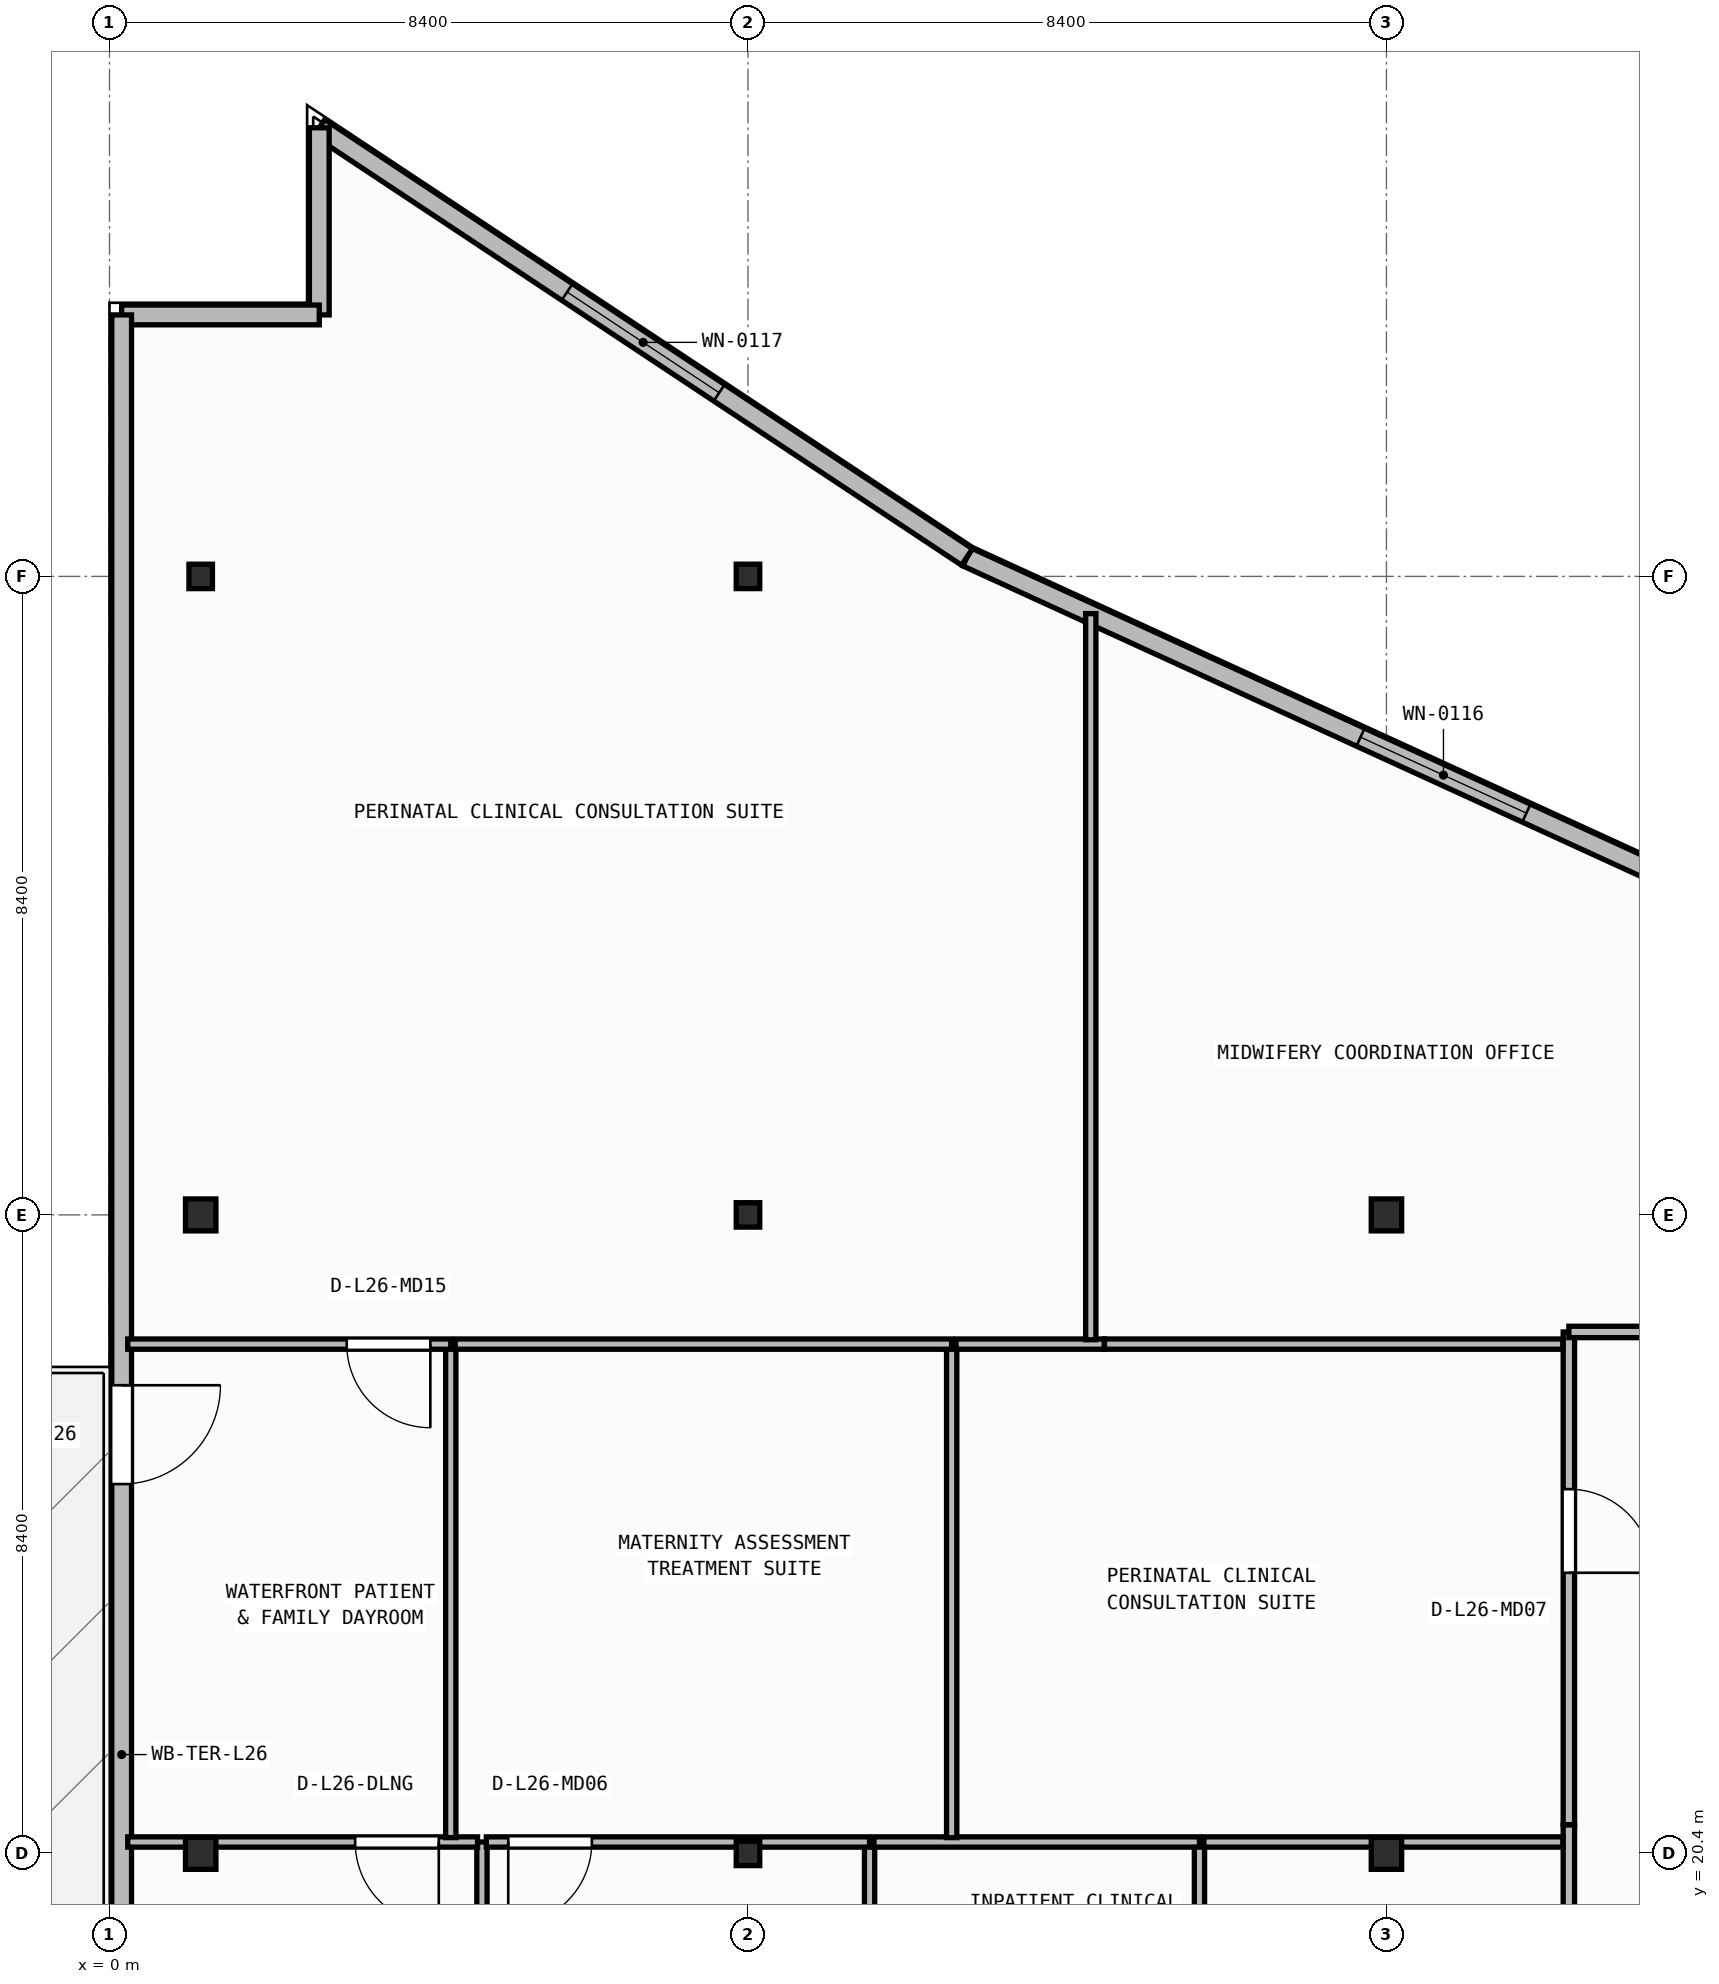
"""IFC4 building model, lengths in metres.
Left out: names, types, materials, properties, quantities, classifications, styles, units other than length and angle.
Written with IfcOpenShell. Run it as: python <this file> out.ifc"""

import sys

from ifc_helpers import new_model, si_unit, direction, frame, frame_2d, origin, origin_2d, place, context, subcontext, project, spatial, rectangle, i_section, extrude, element, fill, save


model = new_model("IFC4")
c1 = context("Model", 3, precision=1e-05, world=origin(), true_north=direction((0.0, 1.0)))
c2 = subcontext(c1, "Body", "Model", "MODEL_VIEW")
j1 = project(units=[si_unit("LENGTHUNIT", "METRE"), si_unit("PLANEANGLEUNIT", "RADIAN")], contexts=[c1])
p1 = place(None, origin())
s1 = spatial("IfcSite", under=j1, at=p1, CompositionType="ELEMENT")
p2 = place(p1, origin())
s2 = spatial("IfcBuilding", under=s1, at=p2, CompositionType="ELEMENT")
p3 = place(p2, frame((0.0, 0.0, 107.3)))
s3 = spatial("IfcBuildingStorey", under=s2, at=p3, CompositionType="ELEMENT", Elevation=107.3)
p4 = place(p3, frame((1.2, 20.4, 0.0), z_axis=(0.0, 0.0, 1.0), x_axis=(1.0, 0.0, 0.0)))
e1 = element("IfcColumn", 1, at=p4, inside=s3, PredefinedType="COLUMN", context=c2, shape_type="SweptSolid", body=[
    extrude(i_section(OverallWidth=0.4, OverallDepth=0.42, WebThickness=0.025, FlangeThickness=0.04, at=origin_2d()), origin(), (0.0, 0.0, 1.0), 3.95),
])
p5 = place(p3, frame((8.4, 20.4, 0.0), z_axis=(0.0, 0.0, 1.0), x_axis=(1.0, 0.0, 0.0)))
e2 = element("IfcColumn", 2, at=p5, inside=s3, PredefinedType="COLUMN", context=c2, shape_type="SweptSolid", body=[
    extrude(i_section(OverallWidth=0.309, OverallDepth=0.321, WebThickness=0.014, FlangeThickness=0.022, FilletRadius=0.017, at=origin_2d()), origin(), (0.0, 0.0, 1.0), 3.95),
])
for number, where, z_axis, x_axis in (
    (3, (16.8, 20.4, 0.0), (0.0, 0.0, 1.0), (1.0, 0.0, 0.0)),
    (4, (1.2, 28.8, 0.0), (0.0, 0.0, 1.0), (1.0, 0.0, 0.0)),
):
    element("IfcColumn", number, at=place(p3, frame(where, z_axis=z_axis, x_axis=x_axis)), inside=s3, PredefinedType="COLUMN", context=c2, shape_type="SweptSolid", body=[
        extrude(i_section(OverallWidth=0.4, OverallDepth=0.42, WebThickness=0.025, FlangeThickness=0.04, at=origin_2d()), origin(), (0.0, 0.0, 1.0), 3.95),
    ])
p6 = place(p3, frame((8.4, 28.8, 0.0), z_axis=(0.0, 0.0, 1.0), x_axis=(1.0, 0.0, 0.0)))
e5 = element("IfcColumn", 5, at=p6, inside=s3, PredefinedType="COLUMN", context=c2, shape_type="SweptSolid", body=[
    extrude(i_section(OverallWidth=0.309, OverallDepth=0.321, WebThickness=0.014, FlangeThickness=0.022, FilletRadius=0.017, at=origin_2d()), origin(), (0.0, 0.0, 1.0), 3.95),
])
p7 = place(p3, frame((16.8, 28.8, 0.0), z_axis=(0.0, 0.0, 1.0), x_axis=(1.0, 0.0, 0.0)))
e6 = element("IfcColumn", 6, at=p7, inside=s3, PredefinedType="COLUMN", context=c2, shape_type="SweptSolid", body=[
    extrude(i_section(OverallWidth=0.4, OverallDepth=0.42, WebThickness=0.025, FlangeThickness=0.04, at=origin_2d()), origin(), (0.0, 0.0, 1.0), 3.95),
])
for number, where, z_axis, x_axis in (
    (7, (1.2, 37.2, 0.0), (0.0, 0.0, 1.0), (1.0, 0.0, 0.0)),
    (8, (8.4, 37.2, 0.0), (0.0, 0.0, 1.0), (1.0, 0.0, 0.0)),
):
    element("IfcColumn", number, at=place(p3, frame(where, z_axis=z_axis, x_axis=x_axis)), inside=s3, PredefinedType="COLUMN", context=c2, shape_type="SweptSolid", body=[
        extrude(i_section(OverallWidth=0.309, OverallDepth=0.321, WebThickness=0.014, FlangeThickness=0.022, FilletRadius=0.017, at=origin_2d()), origin(), (0.0, 0.0, 1.0), 3.95),
    ])
p8 = place(p3, frame((23.818, 31.716, 0.0), z_axis=(0.0, 0.0, 1.0), x_axis=(-0.909209527513, 0.416338846471, 0.0)))
e9 = element("IfcWall", 9, at=p8, inside=s3, PredefinedType="STANDARD", context=c2, shape_type="SweptSolid", body=[
    extrude(rectangle(XDim=13.787, YDim=0.26, at=frame_2d((6.894, 0.0))), origin(), (0.0, 0.0, 1.0), 3.71),
])
p9 = place(p8, frame((5.694, 0.0, 0.9)))
e10 = element("IfcOpeningElement", 10, at=p9, cuts=e9, PredefinedType="OPENING", context=c2, shape_type="SweptSolid", body=[
    extrude(rectangle(XDim=2.4, YDim=1.65, at=frame_2d((1.2, 0.825))), frame((0.0, 0.14, 0.0), z_axis=(0.0, -1.0, 0.0), x_axis=(1.0, 0.0, 0.0)), (0.0, 0.0, 1.0), 0.28),
])
p10 = place(p3, frame((11.282, 37.456, 0.0), z_axis=(0.0, 0.0, 1.0), x_axis=(-0.833630474253, 0.552322580017, 0.0)))
e11 = element("IfcWall", 11, at=p10, inside=s3, PredefinedType="STANDARD", context=c2, shape_type="SweptSolid", body=[
    extrude(rectangle(XDim=10.223, YDim=0.26, at=frame_2d((5.111, 0.0))), origin(), (0.0, 0.0, 1.0), 3.71),
])
p11 = place(p10, frame((3.911, 0.0, 0.9)))
e12 = element("IfcOpeningElement", 12, at=p11, cuts=e11, PredefinedType="OPENING", context=c2, shape_type="SweptSolid", body=[
    extrude(rectangle(XDim=2.4, YDim=1.65, at=frame_2d((1.2, 0.825))), frame((0.0, 0.14, 0.0), z_axis=(0.0, -1.0, 0.0), x_axis=(1.0, 0.0, 0.0)), (0.0, 0.0, 1.0), 0.28),
])
p12 = place(p3, frame((2.76, 43.102, 0.0), z_axis=(0.0, 0.0, 1.0), x_axis=(0.0, -1.0, 0.0)))
e13 = element("IfcWall", 13, at=p12, inside=s3, PredefinedType="STANDARD", context=c2, shape_type="SweptSolid", body=[
    extrude(rectangle(XDim=2.462, YDim=0.26, at=frame_2d((1.231, 0.0))), origin(), (0.0, 0.0, 1.0), 3.71),
])
p13 = place(p3, frame((2.76, 40.64, 0.0), z_axis=(0.0, 0.0, 1.0), x_axis=(-1.0, 0.0, 0.0)))
e14 = element("IfcWall", 14, at=p13, inside=s3, PredefinedType="STANDARD", context=c2, shape_type="SweptSolid", body=[
    extrude(rectangle(XDim=2.6, YDim=0.26, at=frame_2d((1.3, 0.0))), origin(), (0.0, 0.0, 1.0), 3.71),
])
p14 = place(p3, frame((0.16, 40.64, 0.0), z_axis=(0.0, 0.0, 1.0), x_axis=(0.0, -1.0, 0.0)))
e15 = element("IfcWall", 15, at=p14, inside=s3, PredefinedType="STANDARD", context=c2, shape_type="SweptSolid", body=[
    extrude(rectangle(XDim=37.88, YDim=0.26, at=frame_2d((18.94, 0.0))), origin(), (0.0, 0.0, 1.0), 3.71),
])
p15 = place(p14, frame((14.081, 0.0, 0.0)))
e16 = element("IfcOpeningElement", 16, at=p15, cuts=e15, PredefinedType="OPENING", context=c2, shape_type="SweptSolid", body=[
    extrude(rectangle(XDim=1.3, YDim=2.15, at=frame_2d((0.65, 1.075))), frame((0.0, 0.14, 0.0), z_axis=(0.0, -1.0, 0.0), x_axis=(1.0, 0.0, 0.0)), (0.0, 0.0, 1.0), 0.28),
])
p16 = place(p3, frame((19.2, 20.776, 0.0), z_axis=(0.0, 0.0, 1.0), x_axis=(0.0, -1.0, 0.0)))
e17 = element("IfcWall", 17, at=p16, inside=s3, PredefinedType="PARTITIONING", context=c2, shape_type="SweptSolid", body=[
    extrude(rectangle(XDim=6.076, YDim=0.15, at=frame_2d((3.038, 0.0))), origin(), (0.0, 0.0, 1.0), 3.71),
])
p17 = place(p3, frame((19.2, 27.26, 0.0), z_axis=(0.0, 0.0, 1.0), x_axis=(0.0, -1.0, 0.0)))
e18 = element("IfcWall", 18, at=p17, inside=s3, PredefinedType="PARTITIONING", context=c2, shape_type="SweptSolid", body=[
    extrude(rectangle(XDim=6.482, YDim=0.15, at=frame_2d((3.241, 0.0))), origin(), (0.0, 0.0, 1.0), 3.71),
])
p18 = place(p17, frame((2.068, 0.0, 0.0)))
e19 = element("IfcOpeningElement", 19, at=p18, cuts=e18, PredefinedType="OPENING", context=c2, shape_type="SweptSolid", body=[
    extrude(rectangle(XDim=1.1, YDim=2.1, at=frame_2d((0.55, 1.05))), frame((0.0, 0.085, 0.0), z_axis=(0.0, -1.0, 0.0), x_axis=(1.0, 0.0, 0.0)), (0.0, 0.0, 1.0), 0.17),
])
p19 = place(p3, frame((21.7, 27.26, 0.0), z_axis=(0.0, 0.0, 1.0), x_axis=(-1.0, 0.0, 0.0)))
e20 = element("IfcWall", 20, at=p19, inside=s3, PredefinedType="PARTITIONING", context=c2, shape_type="SweptSolid", body=[
    extrude(rectangle(XDim=2.5, YDim=0.15, at=frame_2d((1.25, 0.0))), origin(), (0.0, 0.0, 1.0), 3.71),
])
p20 = place(p19, frame((0.225, 0.0, 0.0)))
e21 = element("IfcOpeningElement", 21, at=p20, cuts=e20, PredefinedType="OPENING", context=c2, shape_type="SweptSolid", body=[
    extrude(rectangle(XDim=1.1, YDim=2.1, at=frame_2d((0.55, 1.05))), frame((0.0, 0.085, 0.0), z_axis=(0.0, -1.0, 0.0), x_axis=(1.0, 0.0, 0.0)), (0.0, 0.0, 1.0), 0.17),
])
p21 = place(p3, frame((4.9, 18.04, 0.0), z_axis=(0.0, 0.0, 1.0), x_axis=(0.0, 1.0, 0.0)))
e22 = element("IfcWall", 22, at=p21, inside=s3, PredefinedType="PARTITIONING", context=c2, shape_type="SweptSolid", body=[
    extrude(rectangle(XDim=2.51, YDim=0.135, at=frame_2d((1.255, 0.0))), origin(), (0.0, 0.0, 1.0), 3.71),
])
p22 = place(p3, frame((4.843, 20.55, 0.0), z_axis=(0.0, 0.0, 1.0), x_axis=(-1.0, 0.0, 0.0)))
e23 = element("IfcWall", 23, at=p22, inside=s3, PredefinedType="PARTITIONING", context=c2, shape_type="SweptSolid", body=[
    extrude(rectangle(XDim=4.603, YDim=0.135, at=frame_2d((2.301, 0.0))), origin(), (0.0, 0.0, 1.0), 3.083),
])
p23 = place(p22, frame((0.51, 0.0, 0.0)))
e24 = element("IfcOpeningElement", 24, at=p23, cuts=e23, PredefinedType="OPENING", context=c2, shape_type="SweptSolid", body=[
    extrude(rectangle(XDim=1.1, YDim=2.1, at=frame_2d((0.55, 1.05))), frame((0.0, 0.077, 0.0), z_axis=(0.0, -1.0, 0.0), x_axis=(1.0, 0.0, 0.0)), (0.0, 0.0, 1.0), 0.155),
])
p24 = place(p3, frame((10.0, 17.833, 0.0), z_axis=(0.0, 0.0, 1.0), x_axis=(0.0, 1.0, 0.0)))
e25 = element("IfcWall", 25, at=p24, inside=s3, PredefinedType="PARTITIONING", context=c2, shape_type="SweptSolid", body=[
    extrude(rectangle(XDim=2.718, YDim=0.135, at=frame_2d((1.359, 0.0))), origin(), (0.0, 0.0, 1.0), 3.71),
])
p25 = place(p3, frame((10.0, 20.55, 0.0), z_axis=(0.0, 0.0, 1.0), x_axis=(-1.0, 0.0, 0.0)))
e26 = element("IfcWall", 26, at=p25, inside=s3, PredefinedType="PARTITIONING", context=c2, shape_type="SweptSolid", body=[
    extrude(rectangle(XDim=5.042, YDim=0.135, at=frame_2d((2.521, 0.0))), origin(), (0.0, 0.0, 1.0), 3.083),
])
p26 = place(p25, frame((3.654, 0.0, 0.0)))
e27 = element("IfcOpeningElement", 27, at=p26, cuts=e26, PredefinedType="OPENING", context=c2, shape_type="SweptSolid", body=[
    extrude(rectangle(XDim=1.1, YDim=2.1, at=frame_2d((0.55, 1.05))), frame((0.0, 0.077, 0.0), z_axis=(0.0, -1.0, 0.0), x_axis=(1.0, 0.0, 0.0)), (0.0, 0.0, 1.0), 0.155),
])
p27 = place(p3, frame((14.34, 17.833, 0.0), z_axis=(0.0, 0.0, 1.0), x_axis=(0.0, 1.0, 0.0)))
e28 = element("IfcWall", 28, at=p27, inside=s3, PredefinedType="PARTITIONING", context=c2, shape_type="SweptSolid", body=[
    extrude(rectangle(XDim=2.718, YDim=0.135, at=frame_2d((1.359, 0.0))), origin(), (0.0, 0.0, 1.0), 3.71),
])
p28 = place(p3, frame((14.34, 20.55, 0.0), z_axis=(0.0, 0.0, 1.0), x_axis=(-1.0, 0.0, 0.0)))
e29 = element("IfcWall", 29, at=p28, inside=s3, PredefinedType="PARTITIONING", context=c2, shape_type="SweptSolid", body=[
    extrude(rectangle(XDim=4.282, YDim=0.135, at=frame_2d((2.141, 0.0))), origin(), (0.0, 0.0, 1.0), 3.083),
])
p29 = place(p3, frame((19.12, 20.55, 0.0), z_axis=(0.0, 0.0, 1.0), x_axis=(-1.0, 0.0, 0.0)))
e30 = element("IfcWall", 30, at=p29, inside=s3, PredefinedType="PARTITIONING", context=c2, shape_type="SweptSolid", body=[
    extrude(rectangle(XDim=4.723, YDim=0.135, at=frame_2d((2.361, 0.0))), origin(), (0.0, 0.0, 1.0), 3.083),
])
p30 = place(p3, frame((4.49, 20.607, 0.0), z_axis=(0.0, 0.0, 1.0), x_axis=(0.0, 1.0, 0.0)))
e31 = element("IfcWall", 31, at=p30, inside=s3, PredefinedType="PARTITIONING", context=c2, shape_type="SweptSolid", body=[
    extrude(rectangle(XDim=6.493, YDim=0.135, at=frame_2d((3.246, 0.0))), origin(), (0.0, 0.0, 1.0), 3.71),
])
p31 = place(p3, frame((4.49, 27.1, 0.0), z_axis=(0.0, 0.0, 1.0), x_axis=(-1.0, 0.0, 0.0)))
e32 = element("IfcWall", 32, at=p31, inside=s3, PredefinedType="PARTITIONING", context=c2, shape_type="SweptSolid", body=[
    extrude(rectangle(XDim=4.25, YDim=0.135, at=frame_2d((2.125, 0.0))), origin(), (0.0, 0.0, 1.0), 3.71),
])
p32 = place(p31, frame((0.269, 0.0, 0.0)))
e33 = element("IfcOpeningElement", 33, at=p32, cuts=e32, PredefinedType="OPENING", context=c2, shape_type="SweptSolid", body=[
    extrude(rectangle(XDim=1.1, YDim=2.1, at=frame_2d((0.55, 1.05))), frame((0.0, 0.077, 0.0), z_axis=(0.0, -1.0, 0.0), x_axis=(1.0, 0.0, 0.0)), (0.0, 0.0, 1.0), 0.155),
])
p33 = place(p3, frame((11.08, 20.607, 0.0), z_axis=(0.0, 0.0, 1.0), x_axis=(0.0, 1.0, 0.0)))
e34 = element("IfcWall", 34, at=p33, inside=s3, PredefinedType="PARTITIONING", context=c2, shape_type="SweptSolid", body=[
    extrude(rectangle(XDim=6.493, YDim=0.135, at=frame_2d((3.246, 0.0))), origin(), (0.0, 0.0, 1.0), 3.71),
])
p34 = place(p3, frame((11.08, 27.1, 0.0), z_axis=(0.0, 0.0, 1.0), x_axis=(-1.0, 0.0, 0.0)))
e35 = element("IfcWall", 35, at=p34, inside=s3, PredefinedType="PARTITIONING", context=c2, shape_type="SweptSolid", body=[
    extrude(rectangle(XDim=6.532, YDim=0.135, at=frame_2d((3.266, 0.0))), origin(), (0.0, 0.0, 1.0), 3.71),
])
p35 = place(p3, frame((13.088, 27.1, 0.0), z_axis=(0.0, 0.0, 1.0), x_axis=(-1.0, 0.0, 0.0)))
e36 = element("IfcWall", 36, at=p35, inside=s3, PredefinedType="PARTITIONING", context=c2, shape_type="SweptSolid", body=[
    extrude(rectangle(XDim=1.951, YDim=0.135, at=frame_2d((0.976, 0.0))), origin(), (0.0, 0.0, 1.0), 3.71),
])
p36 = place(p3, frame((19.12, 27.1, 0.0), z_axis=(0.0, 0.0, 1.0), x_axis=(-1.0, 0.0, 0.0)))
e37 = element("IfcWall", 37, at=p36, inside=s3, PredefinedType="PARTITIONING", context=c2, shape_type="SweptSolid", body=[
    extrude(rectangle(XDim=6.03, YDim=0.135, at=frame_2d((3.015, 0.0))), origin(), (0.0, 0.0, 1.0), 3.71),
])
p37 = place(p3, frame((12.91, 27.157, 0.0), z_axis=(0.0, 0.0, 1.0), x_axis=(0.0, 1.0, 0.0)))
e38 = element("IfcWall", 38, at=p37, inside=s3, PredefinedType="PARTITIONING", context=c2, shape_type="SweptSolid", body=[
    extrude(rectangle(XDim=9.553, YDim=0.135, at=frame_2d((4.776, 0.0))), origin(), (0.0, 0.0, 1.0), 3.71),
])
p38 = place(p9, origin())
e39 = element("IfcWindow", 39, at=p38, inside=s3, PartitioningType="SINGLE_PANEL", PredefinedType="WINDOW", context=c2, shape_type="SweptSolid", body=[
    extrude(rectangle(XDim=2.4, YDim=1.65, at=frame_2d((1.2, 0.825))), frame((0.0, 0.03, 0.0), z_axis=(0.0, -1.0, 0.0), x_axis=(1.0, 0.0, 0.0)), (0.0, 0.0, 1.0), 0.06),
])
fill(e10, e39)
p39 = place(p11, origin())
e40 = element("IfcWindow", 40, at=p39, inside=s3, PartitioningType="SINGLE_PANEL", PredefinedType="WINDOW", context=c2, shape_type="SweptSolid", body=[
    extrude(rectangle(XDim=2.4, YDim=1.65, at=frame_2d((1.2, 0.825))), frame((0.0, 0.03, 0.0), z_axis=(0.0, -1.0, 0.0), x_axis=(1.0, 0.0, 0.0)), (0.0, 0.0, 1.0), 0.06),
])
fill(e12, e40)
p40 = place(p15, origin())
e41 = element("IfcDoor", 41, at=p40, inside=s3, OperationType="SINGLE_SWING_LEFT", PredefinedType="DOOR", context=c2, shape_type="SweptSolid", body=[
    extrude(rectangle(XDim=1.3, YDim=2.15, at=frame_2d((0.65, 1.075))), frame((0.0, 0.025, 0.0), z_axis=(0.0, -1.0, 0.0), x_axis=(1.0, 0.0, 0.0)), (0.0, 0.0, 1.0), 0.05),
])
fill(e16, e41)
p41 = place(p18, origin())
e42 = element("IfcDoor", 42, at=p41, inside=s3, OperationType="SINGLE_SWING_RIGHT", PredefinedType="DOOR", context=c2, shape_type="SweptSolid", body=[
    extrude(rectangle(XDim=1.1, YDim=2.1, at=frame_2d((0.55, 1.05))), frame((0.0, 0.025, 0.0), z_axis=(0.0, -1.0, 0.0), x_axis=(1.0, 0.0, 0.0)), (0.0, 0.0, 1.0), 0.05),
])
fill(e19, e42)
p42 = place(p23, origin())
e43 = element("IfcDoor", 43, at=p42, inside=s3, OperationType="SINGLE_SWING_LEFT", PredefinedType="DOOR", context=c2, shape_type="SweptSolid", body=[
    extrude(rectangle(XDim=1.1, YDim=2.1, at=frame_2d((0.55, 1.05))), frame((0.0, 0.025, 0.0), z_axis=(0.0, -1.0, 0.0), x_axis=(1.0, 0.0, 0.0)), (0.0, 0.0, 1.0), 0.05),
])
fill(e24, e43)
p43 = place(p26, origin())
e44 = element("IfcDoor", 44, at=p43, inside=s3, OperationType="SINGLE_SWING_RIGHT", PredefinedType="DOOR", context=c2, shape_type="SweptSolid", body=[
    extrude(rectangle(XDim=1.1, YDim=2.1, at=frame_2d((0.55, 1.05))), frame((0.0, 0.025, 0.0), z_axis=(0.0, -1.0, 0.0), x_axis=(1.0, 0.0, 0.0)), (0.0, 0.0, 1.0), 0.05),
])
fill(e27, e44)
p44 = place(p32, origin())
e45 = element("IfcDoor", 45, at=p44, inside=s3, OperationType="SINGLE_SWING_LEFT", PredefinedType="DOOR", context=c2, shape_type="SweptSolid", body=[
    extrude(rectangle(XDim=1.1, YDim=2.1, at=frame_2d((0.55, 1.05))), frame((0.0, 0.025, 0.0), z_axis=(0.0, -1.0, 0.0), x_axis=(1.0, 0.0, 0.0)), (0.0, 0.0, 1.0), 0.05),
])
fill(e33, e45)
save(model, sys.argv[1])
